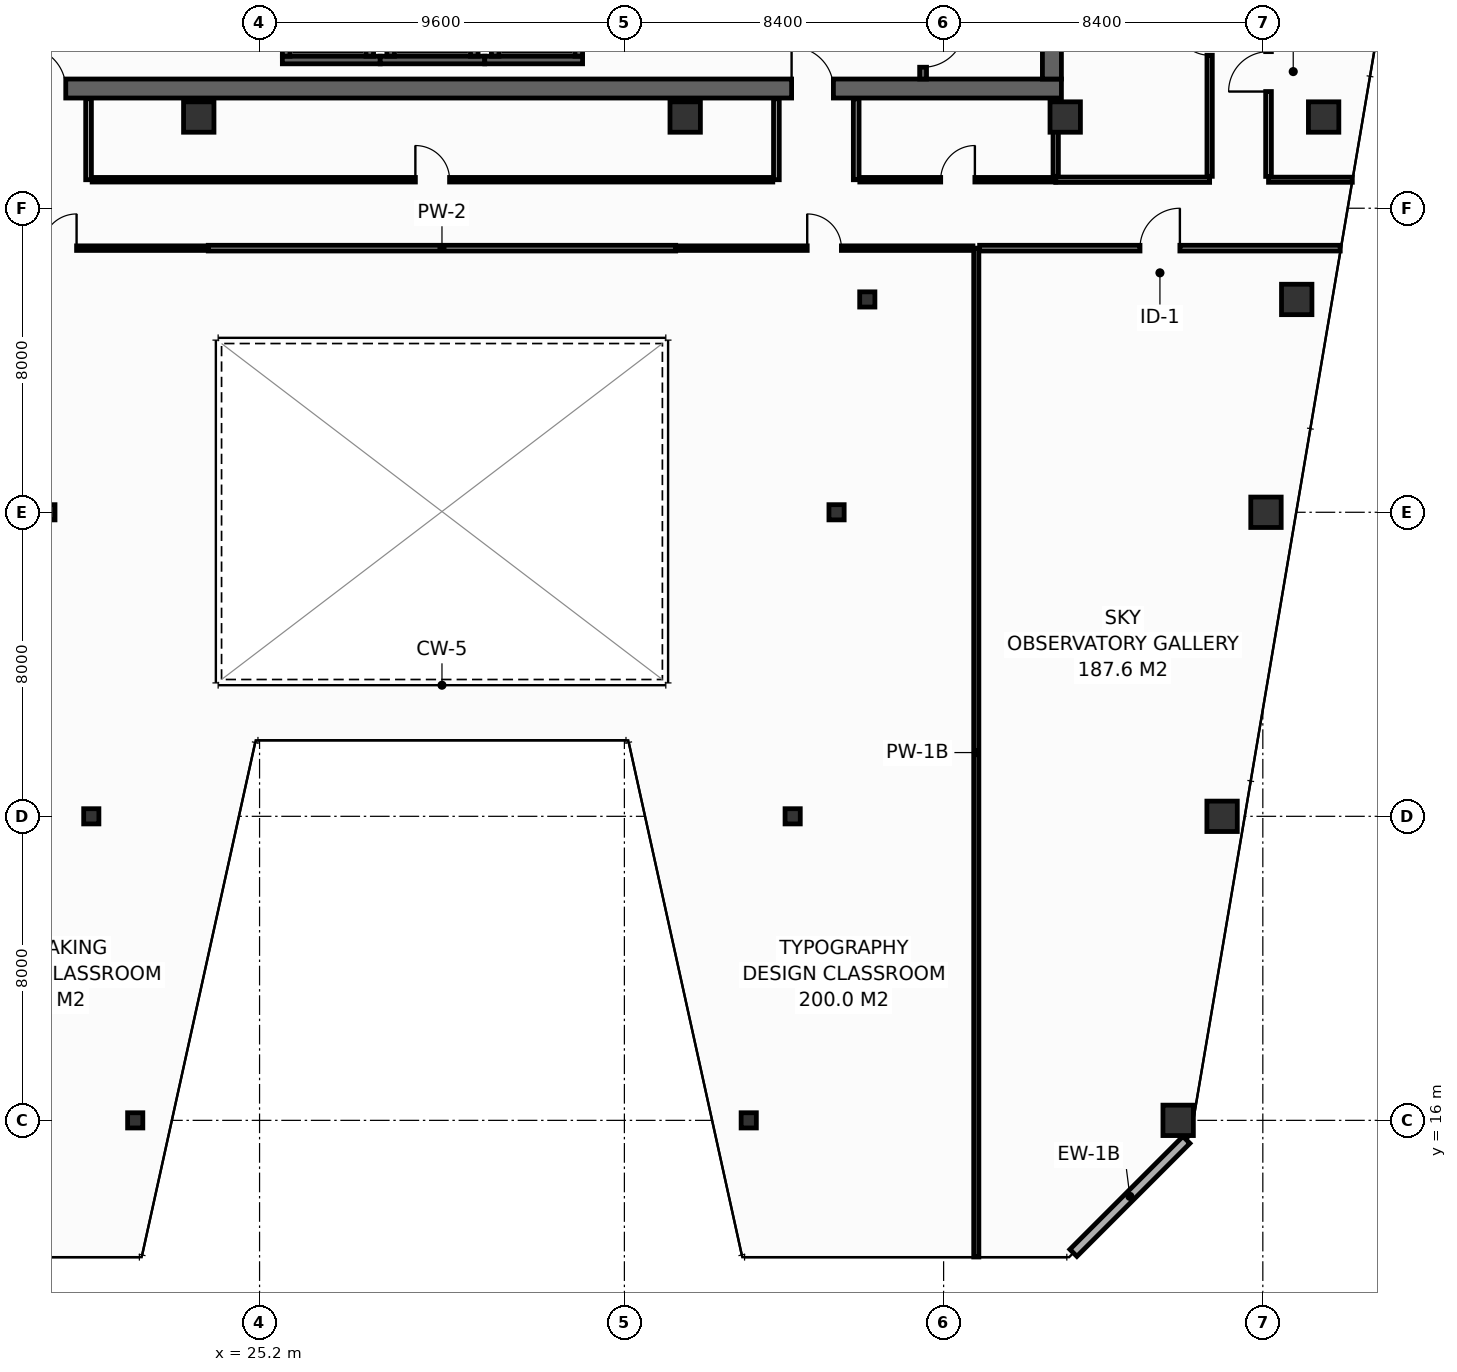
"""IFC4 building model, lengths in metres.
Left out: names, types, materials, properties, quantities, classifications, styles, units other than length and angle.
Written with IfcOpenShell. Run it as: python <this file> out.ifc"""

import sys

from ifc_helpers import new_model, si_unit, direction, frame, frame_2d, origin, origin_2d, place, context, subcontext, project, spatial, rectangle, hollow_rectangle, extrude, element, fill, save


model = new_model("IFC4")
c1 = context("Model", 3, precision=1e-05, world=origin(), true_north=direction((0.0, 1.0)))
c2 = subcontext(c1, "Body", "Model", "MODEL_VIEW")
j1 = project(units=[si_unit("LENGTHUNIT", "METRE"), si_unit("PLANEANGLEUNIT", "RADIAN")], contexts=[c1])
p1 = place(None, origin())
s1 = spatial("IfcSite", under=j1, at=p1, CompositionType="ELEMENT")
p2 = place(p1, origin())
s2 = spatial("IfcBuilding", under=s1, at=p2, CompositionType="ELEMENT")
p3 = place(p2, frame((0.0, 0.0, 213.2)))
s3 = spatial("IfcBuildingStorey", under=s2, at=p3, CompositionType="ELEMENT", Elevation=213.2)
p4 = place(p3, frame((13.6, 43.15, 0.0), z_axis=(0.0, 0.0, 1.0), x_axis=(1.0, 0.0, 0.0)))
e1 = element("IfcWall", 1, at=p4, inside=s3, PredefinedType="SHEAR", context=c2, shape_type="SweptSolid", body=[
    extrude(rectangle(XDim=32.7, YDim=0.5, at=frame_2d((16.35, 0.0))), origin(), (0.0, 0.0, 1.0), 3.55),
])
p5 = place(p4, frame((5.4, 0.0, 0.0)))
e2 = element("IfcOpeningElement", 2, at=p5, cuts=e1, PredefinedType="OPENING", context=c2, shape_type="SweptSolid", body=[
    extrude(rectangle(XDim=1.1, YDim=2.15, at=frame_2d((0.55, 1.075))), frame((0.0, 0.26, 0.0), z_axis=(0.0, -1.0, 0.0), x_axis=(1.0, 0.0, 0.0)), (0.0, 0.0, 1.0), 0.52),
])
p6 = place(p4, frame((25.6, 0.0, 0.0)))
e3 = element("IfcOpeningElement", 3, at=p6, cuts=e1, PredefinedType="OPENING", context=c2, shape_type="SweptSolid", body=[
    extrude(rectangle(XDim=1.1, YDim=2.15, at=frame_2d((0.55, 1.075))), frame((0.0, 0.26, 0.0), z_axis=(0.0, -1.0, 0.0), x_axis=(1.0, 0.0, 0.0)), (0.0, 0.0, 1.0), 0.52),
])
p7 = place(p3, frame((46.05, 43.4, 0.0), z_axis=(0.0, 0.0, 1.0), x_axis=(0.0, 1.0, 0.0)))
e4 = element("IfcWall", 4, at=p7, inside=s3, PredefinedType="SHEAR", context=c2, shape_type="SweptSolid", body=[
    extrude(rectangle(XDim=10.4, YDim=0.5, at=frame_2d((5.2, 0.0))), origin(), (0.0, 0.0, 1.0), 3.55),
])
for number, where, z_axis, x_axis in (
    (5, (23.6, 42.4, 0.0), (0.0, 0.0, 1.0), (1.0, 0.0, 0.0)),
    (6, (36.4, 42.4, 0.0), (0.0, 0.0, 1.0), (1.0, 0.0, 0.0)),
    (7, (46.4, 42.4, 0.0), (0.0, 0.0, 1.0), (1.0, 0.0, 0.0)),
    (8, (53.2, 42.4, 0.0), (0.0, 0.0, 1.0), (1.0, 0.0, 0.0)),
    (9, (49.372, 16.0, 0.0), (0.0, 0.0, 1.0), (1.0, 0.0, 0.0)),
):
    element("IfcColumn", number, at=place(p3, frame(where, z_axis=z_axis, x_axis=x_axis)), inside=s3, PredefinedType="COLUMN", context=c2, shape_type="SweptSolid", body=[
        extrude(hollow_rectangle(XDim=0.8, YDim=0.8, WallThickness=0.036, at=origin_2d()), origin(), (0.0, 0.0, 1.0), 3.8),
    ])
for number, where, z_axis, x_axis in (
    (10, (21.928, 16.0, 0.0), (0.0, 0.0, 1.0), (1.0, 0.0, 0.0)),
    (11, (38.072, 16.0, 0.0), (0.0, 0.0, 1.0), (1.0, 0.0, 0.0)),
):
    element("IfcColumn", number, at=place(p3, frame(where, z_axis=z_axis, x_axis=x_axis)), inside=s3, PredefinedType="COLUMN", context=c2, shape_type="SweptSolid", body=[
        extrude(hollow_rectangle(XDim=0.4, YDim=0.4, WallThickness=0.016, at=origin_2d()), origin(), (0.0, 0.0, 1.0), 3.8),
    ])
p8 = place(p3, frame((50.528, 24.0, 0.0), z_axis=(0.0, 0.0, 1.0), x_axis=(1.0, 0.0, 0.0)))
e12 = element("IfcColumn", 12, at=p8, inside=s3, PredefinedType="COLUMN", context=c2, shape_type="SweptSolid", body=[
    extrude(hollow_rectangle(XDim=0.8, YDim=0.8, WallThickness=0.036, at=origin_2d()), origin(), (0.0, 0.0, 1.0), 3.8),
])
for number, where, z_axis, x_axis in (
    (13, (20.772, 24.0, 0.0), (0.0, 0.0, 1.0), (1.0, 0.0, 0.0)),
    (14, (39.228, 24.0, 0.0), (0.0, 0.0, 1.0), (1.0, 0.0, 0.0)),
):
    element("IfcColumn", number, at=place(p3, frame(where, z_axis=z_axis, x_axis=x_axis)), inside=s3, PredefinedType="COLUMN", context=c2, shape_type="SweptSolid", body=[
        extrude(hollow_rectangle(XDim=0.4, YDim=0.4, WallThickness=0.016, at=origin_2d()), origin(), (0.0, 0.0, 1.0), 3.8),
    ])
p9 = place(p3, frame((51.683, 32.0, 0.0), z_axis=(0.0, 0.0, 1.0), x_axis=(1.0, 0.0, 0.0)))
e15 = element("IfcColumn", 15, at=p9, inside=s3, PredefinedType="COLUMN", context=c2, shape_type="SweptSolid", body=[
    extrude(hollow_rectangle(XDim=0.8, YDim=0.8, WallThickness=0.036, at=origin_2d()), origin(), (0.0, 0.0, 1.0), 3.8),
])
for number, where, z_axis, x_axis in (
    (16, (19.617, 32.0, 0.0), (0.0, 0.0, 1.0), (1.0, 0.0, 0.0)),
    (17, (40.383, 32.0, 0.0), (0.0, 0.0, 1.0), (1.0, 0.0, 0.0)),
):
    element("IfcColumn", number, at=place(p3, frame(where, z_axis=z_axis, x_axis=x_axis)), inside=s3, PredefinedType="COLUMN", context=c2, shape_type="SweptSolid", body=[
        extrude(hollow_rectangle(XDim=0.4, YDim=0.4, WallThickness=0.016, at=origin_2d()), origin(), (0.0, 0.0, 1.0), 3.8),
    ])
p10 = place(p3, frame((52.492, 37.6, 0.0), z_axis=(0.0, 0.0, 1.0), x_axis=(1.0, 0.0, 0.0)))
e18 = element("IfcColumn", 18, at=p10, inside=s3, PredefinedType="COLUMN", context=c2, shape_type="SweptSolid", body=[
    extrude(hollow_rectangle(XDim=0.8, YDim=0.8, WallThickness=0.036, at=origin_2d()), origin(), (0.0, 0.0, 1.0), 3.8),
])
p11 = place(p3, frame((41.192, 37.6, 0.0), z_axis=(0.0, 0.0, 1.0), x_axis=(1.0, 0.0, 0.0)))
e19 = element("IfcColumn", 19, at=p11, inside=s3, PredefinedType="COLUMN", context=c2, shape_type="SweptSolid", body=[
    extrude(hollow_rectangle(XDim=0.4, YDim=0.4, WallThickness=0.016, at=origin_2d()), origin(), (0.0, 0.0, 1.0), 3.8),
])
p12 = place(p3, frame((25.8, 43.9, 0.0), z_axis=(0.0, 0.0, 1.0), x_axis=(1.0, 0.0, 0.0)))
e20 = element("IfcWall", 20, at=p12, inside=s3, PredefinedType="SHEAR", context=c2, shape_type="SweptSolid", body=[
    extrude(rectangle(XDim=2.575, YDim=0.2, at=frame_2d((1.288, 0.0))), origin(), (0.0, 0.0, 1.0), 3.55),
])
for number, where, z_axis, x_axis in (
    (21, (25.9, 44.0, 0.0), (0.0, 0.0, 1.0), (0.0, 1.0, 0.0)),
    (22, (28.1, 44.0, 0.0), (0.0, 0.0, 1.0), (0.0, 1.0, 0.0)),
):
    element("IfcWall", number, at=place(p3, frame(where, z_axis=z_axis, x_axis=x_axis)), inside=s3, PredefinedType="SHEAR", context=c2, shape_type="SweptSolid", body=[
        extrude(rectangle(XDim=2.3, YDim=0.2, at=frame_2d((1.15, 0.0))), origin(), (0.0, 0.0, 1.0), 3.55),
    ])
p13 = place(p3, frame((28.375, 43.9, 0.0), z_axis=(0.0, 0.0, 1.0), x_axis=(1.0, 0.0, 0.0)))
e23 = element("IfcWall", 23, at=p13, inside=s3, PredefinedType="SHEAR", context=c2, shape_type="SweptSolid", body=[
    extrude(rectangle(XDim=2.75, YDim=0.2, at=frame_2d((1.375, 0.0))), origin(), (0.0, 0.0, 1.0), 3.55),
])
for number, where, z_axis, x_axis in (
    (24, (28.65, 44.0, 0.0), (0.0, 0.0, 1.0), (0.0, 1.0, 0.0)),
    (25, (30.85, 44.0, 0.0), (0.0, 0.0, 1.0), (0.0, 1.0, 0.0)),
):
    element("IfcWall", number, at=place(p3, frame(where, z_axis=z_axis, x_axis=x_axis)), inside=s3, PredefinedType="SHEAR", context=c2, shape_type="SweptSolid", body=[
        extrude(rectangle(XDim=2.3, YDim=0.2, at=frame_2d((1.15, 0.0))), origin(), (0.0, 0.0, 1.0), 3.55),
    ])
p14 = place(p3, frame((31.125, 43.9, 0.0), z_axis=(0.0, 0.0, 1.0), x_axis=(1.0, 0.0, 0.0)))
e26 = element("IfcWall", 26, at=p14, inside=s3, PredefinedType="SHEAR", context=c2, shape_type="SweptSolid", body=[
    extrude(rectangle(XDim=2.575, YDim=0.2, at=frame_2d((1.288, 0.0))), origin(), (0.0, 0.0, 1.0), 3.55),
])
for number, where, z_axis, x_axis in (
    (27, (31.4, 44.0, 0.0), (0.0, 0.0, 1.0), (0.0, 1.0, 0.0)),
    (28, (33.6, 44.0, 0.0), (0.0, 0.0, 1.0), (0.0, 1.0, 0.0)),
):
    element("IfcWall", number, at=place(p3, frame(where, z_axis=z_axis, x_axis=x_axis)), inside=s3, PredefinedType="SHEAR", context=c2, shape_type="SweptSolid", body=[
        extrude(rectangle(XDim=2.3, YDim=0.2, at=frame_2d((1.15, 0.0))), origin(), (0.0, 0.0, 1.0), 3.55),
    ])
p15 = place(p3, frame((42.66, 53.8, 0.0), z_axis=(0.0, 0.0, 1.0), x_axis=(0.0, -1.0, 0.0)))
e29 = element("IfcWall", 29, at=p15, inside=s3, PredefinedType="SHEAR", context=c2, shape_type="SweptSolid", body=[
    extrude(rectangle(XDim=10.4, YDim=0.18, at=frame_2d((5.2, 0.0))), origin(), (0.0, 0.0, 1.0), 3.55),
])
p16 = place(p15, frame((8.99, 0.0, 0.0)))
e30 = element("IfcOpeningElement", 30, at=p16, cuts=e29, PredefinedType="OPENING", context=c2, shape_type="SweptSolid", body=[
    extrude(rectangle(XDim=1.1, YDim=2.15, at=frame_2d((0.55, 1.075))), frame((0.0, 0.1, 0.0), z_axis=(0.0, -1.0, 0.0), x_axis=(1.0, 0.0, 0.0)), (0.0, 0.0, 1.0), 0.2),
])
p17 = place(p3, frame((46.615, 12.513, 0.0), z_axis=(0.0, 0.0, 1.0), x_axis=(0.707135806771, 0.70707775441, 0.0)))
e31 = element("IfcWall", 31, at=p17, inside=s3, PredefinedType="STANDARD", context=c2, shape_type="SweptSolid", body=[
    extrude(rectangle(XDim=4.206, YDim=0.26, at=frame_2d((2.103, 0.0))), origin(), (0.0, 0.0, 1.0), 3.55),
])
p18 = place(p3, frame((46.15, 40.75, 0.0), z_axis=(0.0, 0.0, 1.0), x_axis=(1.0, 0.0, 0.0)))
e32 = element("IfcWall", 32, at=p18, inside=s3, PredefinedType="PARTITIONING", context=c2, shape_type="SweptSolid", body=[
    extrude(rectangle(XDim=4.05, YDim=0.14, at=frame_2d((2.025, 0.0))), origin(), (0.0, 0.0, 1.0), 3.55),
])
p19 = place(p3, frame((46.15, 40.84, 0.0), z_axis=(0.0, 0.0, 1.0), x_axis=(0.0, 1.0, 0.0)))
e33 = element("IfcWall", 33, at=p19, inside=s3, PredefinedType="PARTITIONING", context=c2, shape_type="SweptSolid", body=[
    extrude(rectangle(XDim=2.04, YDim=0.14, at=frame_2d((1.02, 0.0))), origin(), (0.0, 0.0, 1.0), 3.55),
])
p20 = place(p3, frame((50.2, 40.84, 0.0), z_axis=(0.0, 0.0, 1.0), x_axis=(0.0, 1.0, 0.0)))
e34 = element("IfcWall", 34, at=p20, inside=s3, PredefinedType="PARTITIONING", context=c2, shape_type="SweptSolid", body=[
    extrude(rectangle(XDim=7.27, YDim=0.14, at=frame_2d((3.635, 0.0))), origin(), (0.0, 0.0, 1.0), 2.835),
])
p21 = place(p20, frame((3.185, 0.0, 0.0)))
e35 = element("IfcOpeningElement", 35, at=p21, cuts=e34, PredefinedType="OPENING", context=c2, shape_type="SweptSolid", body=[
    extrude(rectangle(XDim=0.9, YDim=2.1, at=frame_2d((0.45, 1.05))), frame((0.0, 0.08, 0.0), z_axis=(0.0, -1.0, 0.0), x_axis=(1.0, 0.0, 0.0)), (0.0, 0.0, 1.0), 0.16),
])
p22 = place(p3, frame((51.75, 40.75, 0.0), z_axis=(0.0, 0.0, 1.0), x_axis=(1.0, 0.0, 0.0)))
e36 = element("IfcWall", 36, at=p22, inside=s3, PredefinedType="PARTITIONING", context=c2, shape_type="SweptSolid", body=[
    extrude(rectangle(XDim=2.205, YDim=0.135, at=frame_2d((1.103, 0.0))), origin(), (0.0, 0.0, 1.0), 3.035),
])
p23 = place(p3, frame((51.75, 40.837, 0.0), z_axis=(0.0, 0.0, 1.0), x_axis=(0.0, 1.0, 0.0)))
e37 = element("IfcWall", 37, at=p23, inside=s3, PredefinedType="PARTITIONING", context=c2, shape_type="SweptSolid", body=[
    extrude(rectangle(XDim=5.075, YDim=0.15, at=frame_2d((2.538, 0.0))), origin(), (0.0, 0.0, 1.0), 2.835),
])
p24 = place(p23, frame((2.233, 0.0, 0.0)))
e38 = element("IfcOpeningElement", 38, at=p24, cuts=e37, PredefinedType="OPENING", context=c2, shape_type="SweptSolid", body=[
    extrude(rectangle(XDim=1.05, YDim=2.15, at=frame_2d((0.525, 1.075))), frame((0.0, 0.085, 0.0), z_axis=(0.0, -1.0, 0.0), x_axis=(1.0, 0.0, 0.0)), (0.0, 0.0, 1.0), 0.17),
])
for number, where, z_axis, x_axis in (
    (39, (20.7, 40.75, 0.0), (0.0, 0.0, 1.0), (0.0, 1.0, 0.0)),
    (40, (38.8, 40.75, 0.0), (0.0, 0.0, 1.0), (0.0, 1.0, 0.0)),
    (41, (40.9, 40.75, 0.0), (0.0, 0.0, 1.0), (0.0, 1.0, 0.0)),
):
    element("IfcWall", number, at=place(p3, frame(where, z_axis=z_axis, x_axis=x_axis)), inside=s3, PredefinedType="PARTITIONING", context=c2, shape_type="SweptSolid", body=[
        extrude(rectangle(XDim=2.13, YDim=0.15, at=frame_2d((1.065, 0.0))), origin(), (0.0, 0.0, 1.0), 3.55),
    ])
p25 = place(p3, frame((20.795, 40.75, 0.0), z_axis=(0.0, 0.0, 1.0), x_axis=(1.0, 0.0, 0.0)))
e42 = element("IfcWall", 42, at=p25, inside=s3, PredefinedType="PARTITIONING", context=c2, shape_type="SweptSolid", body=[
    extrude(rectangle(XDim=17.91, YDim=0.12, at=frame_2d((8.955, 0.0))), origin(), (0.0, 0.0, 1.0), 2.835),
])
p26 = place(p25, frame((8.505, 0.0, 0.0)))
e43 = element("IfcOpeningElement", 43, at=p26, cuts=e42, PredefinedType="OPENING", context=c2, shape_type="SweptSolid", body=[
    extrude(rectangle(XDim=0.9, YDim=2.1, at=frame_2d((0.45, 1.05))), frame((0.0, 0.07, 0.0), z_axis=(0.0, -1.0, 0.0), x_axis=(1.0, 0.0, 0.0)), (0.0, 0.0, 1.0), 0.14),
])
p27 = place(p3, frame((40.995, 40.75, 0.0), z_axis=(0.0, 0.0, 1.0), x_axis=(1.0, 0.0, 0.0)))
e44 = element("IfcWall", 44, at=p27, inside=s3, PredefinedType="PARTITIONING", context=c2, shape_type="SweptSolid", body=[
    extrude(rectangle(XDim=5.155, YDim=0.12, at=frame_2d((2.577, 0.0))), origin(), (0.0, 0.0, 1.0), 3.55),
])
p28 = place(p27, frame((2.128, 0.0, 0.0)))
e45 = element("IfcOpeningElement", 45, at=p28, cuts=e44, PredefinedType="OPENING", context=c2, shape_type="SweptSolid", body=[
    extrude(rectangle(XDim=0.9, YDim=2.1, at=frame_2d((0.45, 1.05))), frame((0.0, 0.07, 0.0), z_axis=(0.0, -1.0, 0.0), x_axis=(1.0, 0.0, 0.0)), (0.0, 0.0, 1.0), 0.14),
])
p29 = place(p3, frame((44.06, 12.405, 0.0), z_axis=(0.0, 0.0, 1.0), x_axis=(0.0, 1.0, 0.0)))
e46 = element("IfcWall", 46, at=p29, inside=s3, PredefinedType="PARTITIONING", context=c2, shape_type="SweptSolid", body=[
    extrude(rectangle(XDim=26.545, YDim=0.135, at=frame_2d((13.272, 0.0))), origin(), (0.0, 0.0, 1.0), 2.835),
])
p30 = place(p3, frame((16.02, 38.95, 0.0), z_axis=(0.0, 0.0, 1.0), x_axis=(1.0, 0.0, 0.0)))
e47 = element("IfcWall", 47, at=p30, inside=s3, PredefinedType="PARTITIONING", context=c2, shape_type="SweptSolid", body=[
    extrude(rectangle(XDim=7.83, YDim=0.12, at=frame_2d((3.915, 0.0))), origin(), (0.0, 0.0, 1.0), 2.835),
])
p31 = place(p30, frame((3.465, 0.0, 0.0)))
e48 = element("IfcOpeningElement", 48, at=p31, cuts=e47, PredefinedType="OPENING", context=c2, shape_type="SweptSolid", body=[
    extrude(rectangle(XDim=0.9, YDim=2.1, at=frame_2d((0.45, 1.05))), frame((0.0, 0.07, 0.0), z_axis=(0.0, -1.0, 0.0), x_axis=(1.0, 0.0, 0.0)), (0.0, 0.0, 1.0), 0.14),
])
p32 = place(p3, frame((23.85, 38.95, 0.0), z_axis=(0.0, 0.0, 1.0), x_axis=(1.0, 0.0, 0.0)))
e49 = element("IfcWall", 49, at=p32, inside=s3, PredefinedType="PARTITIONING", context=c2, shape_type="SweptSolid", body=[
    extrude(rectangle(XDim=12.3, YDim=0.15, at=frame_2d((6.15, 0.0))), origin(), (0.0, 0.0, 1.0), 3.55),
])
p33 = place(p3, frame((36.15, 38.95, 0.0), z_axis=(0.0, 0.0, 1.0), x_axis=(1.0, 0.0, 0.0)))
e50 = element("IfcWall", 50, at=p33, inside=s3, PredefinedType="PARTITIONING", context=c2, shape_type="SweptSolid", body=[
    extrude(rectangle(XDim=7.823, YDim=0.12, at=frame_2d((3.911, 0.0))), origin(), (0.0, 0.0, 1.0), 2.835),
])
p34 = place(p33, frame((3.461, 0.0, 0.0)))
e51 = element("IfcOpeningElement", 51, at=p34, cuts=e50, PredefinedType="OPENING", context=c2, shape_type="SweptSolid", body=[
    extrude(rectangle(XDim=0.9, YDim=2.1, at=frame_2d((0.45, 1.05))), frame((0.0, 0.07, 0.0), z_axis=(0.0, -1.0, 0.0), x_axis=(1.0, 0.0, 0.0)), (0.0, 0.0, 1.0), 0.14),
])
p35 = place(p3, frame((44.147, 38.95, 0.0), z_axis=(0.0, 0.0, 1.0), x_axis=(1.0, 0.0, 0.0)))
e52 = element("IfcWall", 52, at=p35, inside=s3, PredefinedType="PARTITIONING", context=c2, shape_type="SweptSolid", body=[
    extrude(rectangle(XDim=9.49, YDim=0.15, at=frame_2d((4.745, 0.0))), origin(), (0.0, 0.0, 1.0), 3.035),
])
p36 = place(p35, frame((4.22, 0.0, 0.0)))
e53 = element("IfcOpeningElement", 53, at=p36, cuts=e52, PredefinedType="OPENING", context=c2, shape_type="SweptSolid", body=[
    extrude(rectangle(XDim=1.05, YDim=2.15, at=frame_2d((0.525, 1.075))), frame((0.0, 0.085, 0.0), z_axis=(0.0, -1.0, 0.0), x_axis=(1.0, 0.0, 0.0)), (0.0, 0.0, 1.0), 0.17),
])
p37 = place(p16, origin())
e54 = element("IfcDoor", 54, at=p37, inside=s3, OperationType="SINGLE_SWING_LEFT", PredefinedType="DOOR", context=c2, shape_type="SweptSolid", body=[
    extrude(rectangle(XDim=1.1, YDim=2.15, at=frame_2d((0.55, 1.075))), frame((0.0, 0.025, 0.0), z_axis=(0.0, -1.0, 0.0), x_axis=(1.0, 0.0, 0.0)), (0.0, 0.0, 1.0), 0.05),
])
fill(e30, e54)
p38 = place(p5, origin())
e55 = element("IfcDoor", 55, at=p38, inside=s3, OperationType="SINGLE_SWING_LEFT", PredefinedType="DOOR", context=c2, shape_type="SweptSolid", body=[
    extrude(rectangle(XDim=1.1, YDim=2.15, at=frame_2d((0.55, 1.075))), frame((0.0, 0.025, 0.0), z_axis=(0.0, -1.0, 0.0), x_axis=(1.0, 0.0, 0.0)), (0.0, 0.0, 1.0), 0.05),
])
fill(e2, e55)
p39 = place(p6, origin())
e56 = element("IfcDoor", 56, at=p39, inside=s3, OperationType="SINGLE_SWING_LEFT", PredefinedType="DOOR", context=c2, shape_type="SweptSolid", body=[
    extrude(rectangle(XDim=1.1, YDim=2.15, at=frame_2d((0.55, 1.075))), frame((0.0, 0.025, 0.0), z_axis=(0.0, -1.0, 0.0), x_axis=(1.0, 0.0, 0.0)), (0.0, 0.0, 1.0), 0.05),
])
fill(e3, e56)
p40 = place(p21, origin())
e57 = element("IfcDoor", 57, at=p40, inside=s3, OperationType="SINGLE_SWING_RIGHT", PredefinedType="DOOR", context=c2, shape_type="SweptSolid", body=[
    extrude(rectangle(XDim=0.9, YDim=2.1, at=frame_2d((0.45, 1.05))), frame((0.0, 0.025, 0.0), z_axis=(0.0, -1.0, 0.0), x_axis=(1.0, 0.0, 0.0)), (0.0, 0.0, 1.0), 0.05),
])
fill(e35, e57)
p41 = place(p24, origin())
e58 = element("IfcDoor", 58, at=p41, inside=s3, OperationType="SINGLE_SWING_LEFT", PredefinedType="DOOR", context=c2, shape_type="SweptSolid", body=[
    extrude(rectangle(XDim=1.05, YDim=2.15, at=frame_2d((0.525, 1.075))), frame((0.0, 0.025, 0.0), z_axis=(0.0, -1.0, 0.0), x_axis=(1.0, 0.0, 0.0)), (0.0, 0.0, 1.0), 0.05),
])
fill(e38, e58)
p42 = place(p26, origin())
e59 = element("IfcDoor", 59, at=p42, inside=s3, OperationType="SINGLE_SWING_LEFT", PredefinedType="DOOR", context=c2, shape_type="SweptSolid", body=[
    extrude(rectangle(XDim=0.9, YDim=2.1, at=frame_2d((0.45, 1.05))), frame((0.0, 0.025, 0.0), z_axis=(0.0, -1.0, 0.0), x_axis=(1.0, 0.0, 0.0)), (0.0, 0.0, 1.0), 0.05),
])
fill(e43, e59)
p43 = place(p28, origin())
e60 = element("IfcDoor", 60, at=p43, inside=s3, OperationType="SINGLE_SWING_RIGHT", PredefinedType="DOOR", context=c2, shape_type="SweptSolid", body=[
    extrude(rectangle(XDim=0.9, YDim=2.1, at=frame_2d((0.45, 1.05))), frame((0.0, 0.025, 0.0), z_axis=(0.0, -1.0, 0.0), x_axis=(1.0, 0.0, 0.0)), (0.0, 0.0, 1.0), 0.05),
])
fill(e45, e60)
p44 = place(p31, origin())
e61 = element("IfcDoor", 61, at=p44, inside=s3, OperationType="SINGLE_SWING_RIGHT", PredefinedType="DOOR", context=c2, shape_type="SweptSolid", body=[
    extrude(rectangle(XDim=0.9, YDim=2.1, at=frame_2d((0.45, 1.05))), frame((0.0, 0.025, 0.0), z_axis=(0.0, -1.0, 0.0), x_axis=(1.0, 0.0, 0.0)), (0.0, 0.0, 1.0), 0.05),
])
fill(e48, e61)
p45 = place(p34, origin())
e62 = element("IfcDoor", 62, at=p45, inside=s3, OperationType="SINGLE_SWING_LEFT", PredefinedType="DOOR", context=c2, shape_type="SweptSolid", body=[
    extrude(rectangle(XDim=0.9, YDim=2.1, at=frame_2d((0.45, 1.05))), frame((0.0, 0.025, 0.0), z_axis=(0.0, -1.0, 0.0), x_axis=(1.0, 0.0, 0.0)), (0.0, 0.0, 1.0), 0.05),
])
fill(e51, e62)
p46 = place(p36, origin())
e63 = element("IfcDoor", 63, at=p46, inside=s3, OperationType="SINGLE_SWING_RIGHT", PredefinedType="DOOR", context=c2, shape_type="SweptSolid", body=[
    extrude(rectangle(XDim=1.05, YDim=2.15, at=frame_2d((0.525, 1.075))), frame((0.0, 0.025, 0.0), z_axis=(0.0, -1.0, 0.0), x_axis=(1.0, 0.0, 0.0)), (0.0, 0.0, 1.0), 0.05),
])
fill(e53, e63)
save(model, sys.argv[1])
